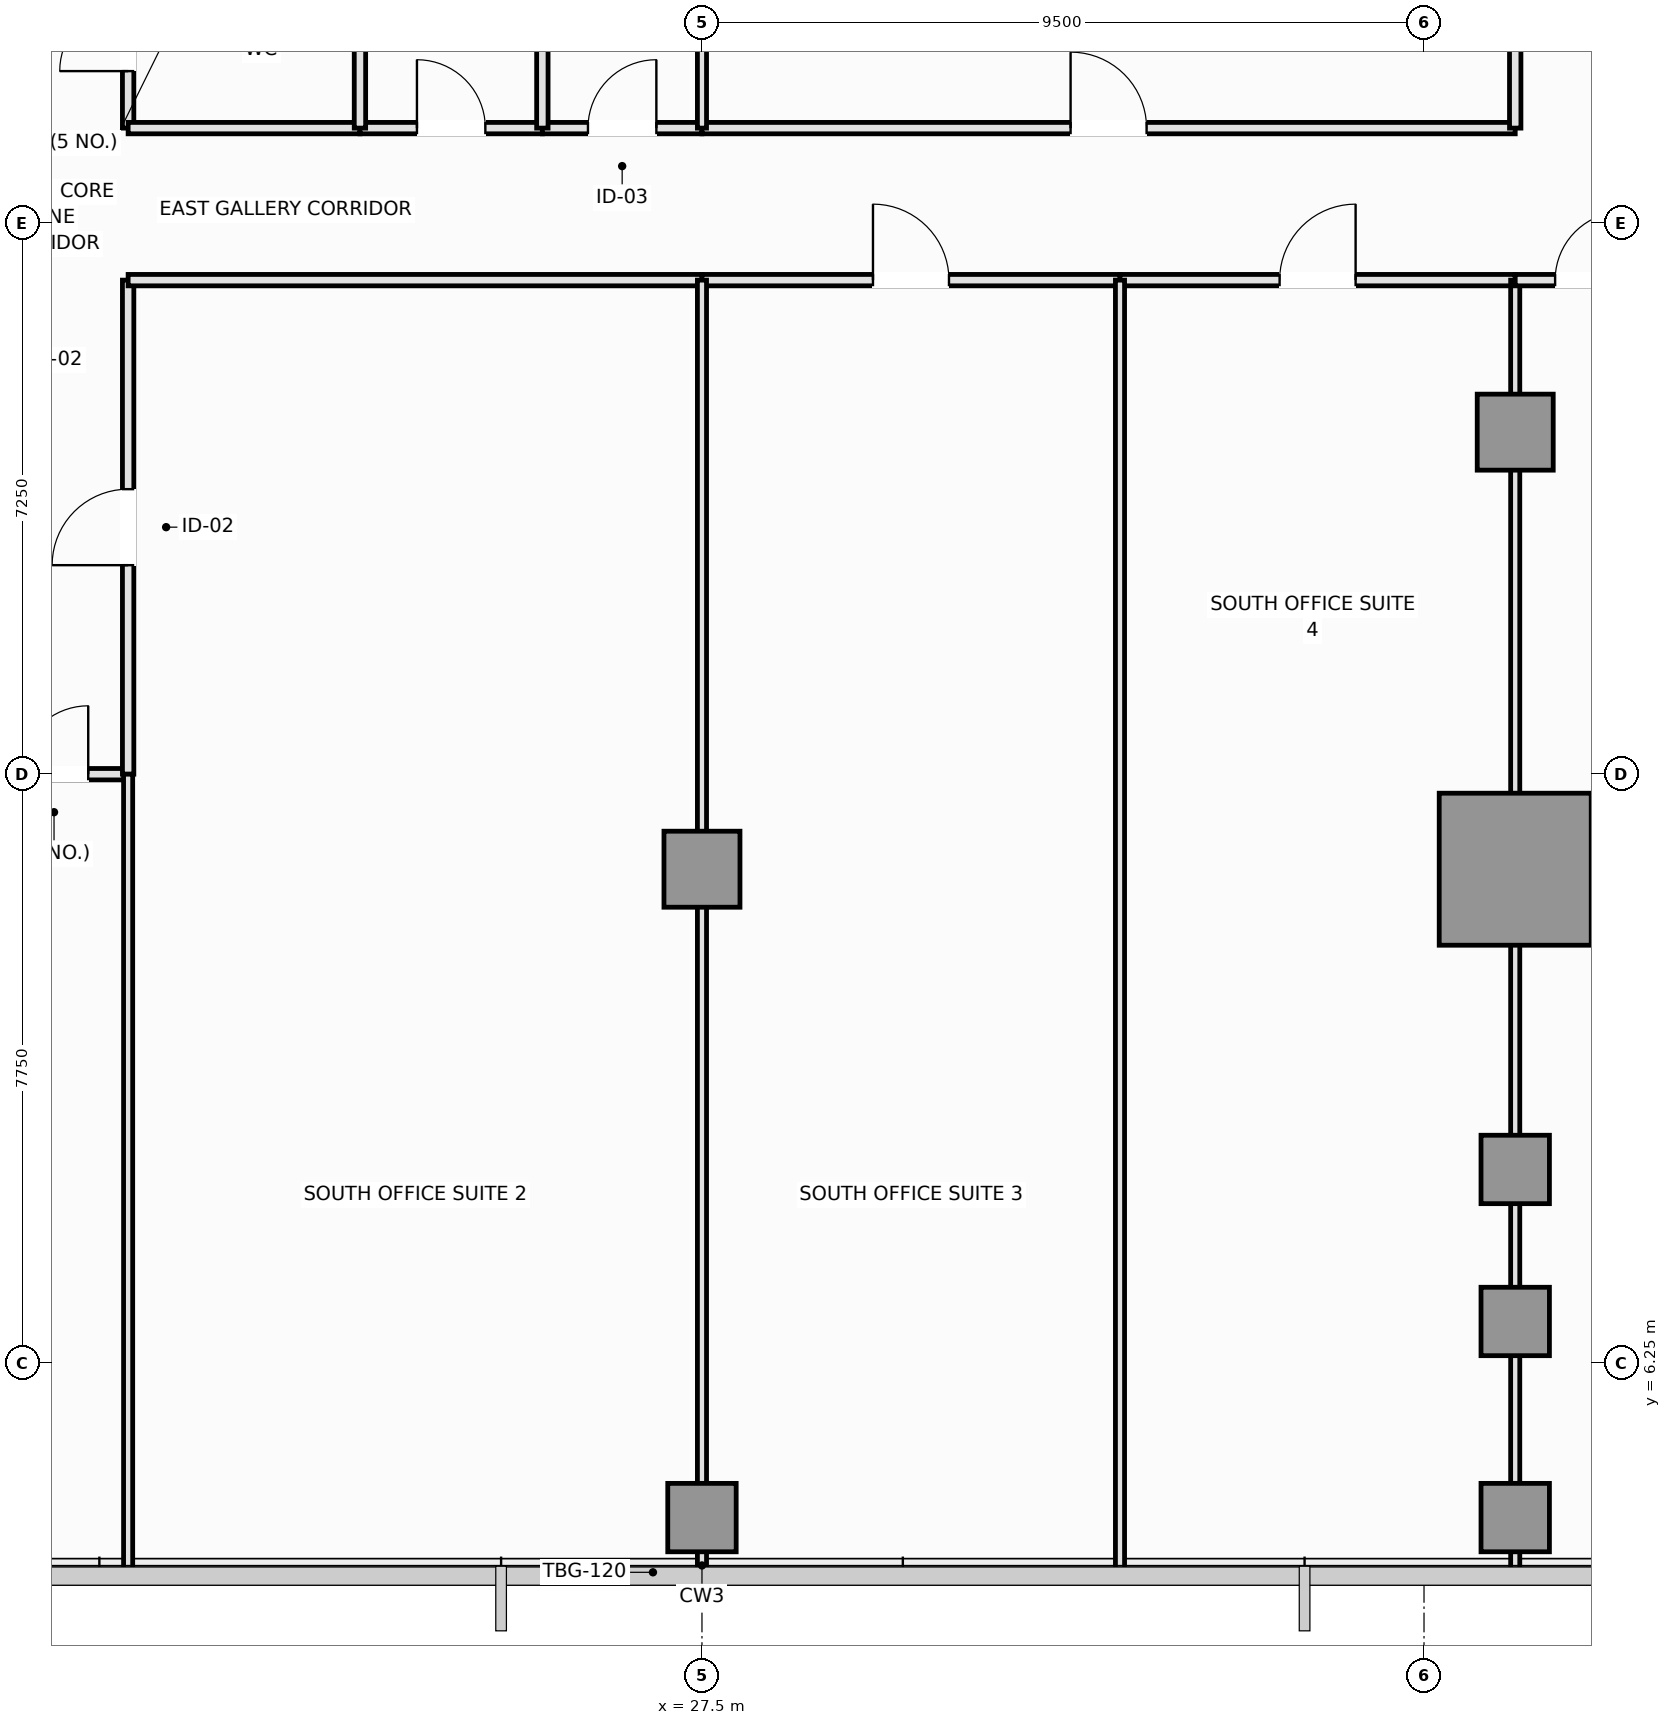
"""IFC4 building model, lengths in metres.
Left out: names, types, materials, properties, quantities, classifications, styles, units other than length and angle.
Written with IfcOpenShell. Run it as: python <this file> out.ifc"""

import sys

from ifc_helpers import new_model, si_unit, direction, frame, frame_2d, origin, origin_2d, place, context, subcontext, project, spatial, rectangle, extrude, element, fill, save


model = new_model("IFC4")
c1 = context("Model", 3, precision=1e-05, world=origin(), true_north=direction((0.0, 1.0)))
c2 = subcontext(c1, "Body", "Model", "MODEL_VIEW")
j1 = project(units=[si_unit("LENGTHUNIT", "METRE"), si_unit("PLANEANGLEUNIT", "RADIAN")], contexts=[c1])
p1 = place(None, origin())
s1 = spatial("IfcSite", under=j1, at=p1, CompositionType="ELEMENT")
p2 = place(p1, origin())
s2 = spatial("IfcBuilding", under=s1, at=p2, CompositionType="ELEMENT")
p3 = place(p2, frame((0.0, 0.0, 105.8)))
s3 = spatial("IfcBuildingStorey", under=s2, at=p3, CompositionType="ELEMENT", Elevation=105.8)
p4 = place(p3, frame((38.2, 12.75, 0.0), z_axis=(0.0, 0.0, 1.0), x_axis=(1.0, 0.0, 0.0)))
e1 = element("IfcColumn", 1, at=p4, inside=s3, PredefinedType="COLUMN", context=c2, shape_type="SweptSolid", body=[
    extrude(rectangle(XDim=2.0, YDim=2.0, at=origin_2d()), origin(), (0.0, 0.0, 1.0), 3.55),
])
for number, where, z_axis, x_axis in (
    (2, (27.5, 12.75, 0.0), (0.0, 0.0, 1.0), (1.0, 0.0, 0.0)),
    (3, (38.2, 18.5, 0.0), (0.0, 0.0, 1.0), (1.0, 0.0, 0.0)),
):
    element("IfcColumn", number, at=place(p3, frame(where, z_axis=z_axis, x_axis=x_axis)), inside=s3, PredefinedType="COLUMN", context=c2, shape_type="SweptSolid", body=[
        extrude(rectangle(XDim=1.0, YDim=1.0, at=origin_2d()), origin(), (0.0, 0.0, 1.0), 3.55),
    ])
for number, where, z_axis, x_axis in (
    (4, (38.2, 6.8, 0.0), (0.0, 0.0, 1.0), (1.0, 0.0, 0.0)),
    (5, (38.2, 8.8, 0.0), (0.0, 0.0, 1.0), (1.0, 0.0, 0.0)),
    (6, (27.5, 4.22, 0.0), (0.0, 0.0, 1.0), (1.0, 0.0, 0.0)),
    (7, (38.2, 4.22, 0.0), (0.0, 0.0, 1.0), (1.0, 0.0, 0.0)),
):
    element("IfcColumn", number, at=place(p3, frame(where, z_axis=z_axis, x_axis=x_axis)), inside=s3, PredefinedType="COLUMN", context=c2, shape_type="SweptSolid", body=[
        extrude(rectangle(XDim=0.9, YDim=0.9, at=origin_2d()), origin(), (0.0, 0.0, 1.0), 3.55),
    ])
p5 = place(p3, frame((19.95, 22.5, 0.0), z_axis=(0.0, 0.0, 1.0), x_axis=(0.0, 1.0, 0.0)))
e8 = element("IfcWall", 8, at=p5, inside=s3, PredefinedType="PLUMBINGWALL", context=c2, shape_type="SweptSolid", body=[
    extrude(rectangle(XDim=2.4, YDim=0.15, at=frame_2d((1.2, 0.0))), origin(), (0.0, 0.0, 1.0), 3.37),
])
p6 = place(p5, frame((0.75, 0.0, 0.0)))
e9 = element("IfcOpeningElement", 9, at=p6, cuts=e8, PredefinedType="OPENING", context=c2, shape_type="SweptSolid", body=[
    extrude(rectangle(XDim=0.9, YDim=2.1, at=frame_2d((0.45, 1.05))), frame((0.0, 0.085, 0.0), z_axis=(0.0, -1.0, 0.0), x_axis=(1.0, 0.0, 0.0)), (0.0, 0.0, 1.0), 0.17),
])
p7 = place(p3, frame((18.0, 14.0, 0.0), z_axis=(0.0, 0.0, 1.0), x_axis=(1.0, 0.0, 0.0)))
e10 = element("IfcWall", 10, at=p7, inside=s3, PredefinedType="PARTITIONING", context=c2, shape_type="SweptSolid", body=[
    extrude(rectangle(XDim=1.95, YDim=0.15, at=frame_2d((0.975, 0.0))), origin(), (0.0, 0.0, 1.0), 3.37),
])
p8 = place(p7, frame((0.525, 0.0, 0.0)))
e11 = element("IfcOpeningElement", 11, at=p8, cuts=e10, PredefinedType="OPENING", context=c2, shape_type="SweptSolid", body=[
    extrude(rectangle(XDim=0.9, YDim=2.1, at=frame_2d((0.45, 1.05))), frame((0.0, 0.085, 0.0), z_axis=(0.0, -1.0, 0.0), x_axis=(1.0, 0.0, 0.0)), (0.0, 0.0, 1.0), 0.17),
])
p9 = place(p3, frame((19.95, 14.0, 0.0), z_axis=(0.0, 0.0, 1.0), x_axis=(0.0, 1.0, 0.0)))
e12 = element("IfcWall", 12, at=p9, inside=s3, PredefinedType="PARTITIONING", context=c2, shape_type="SweptSolid", body=[
    extrude(rectangle(XDim=6.5, YDim=0.15, at=frame_2d((3.25, 0.0))), origin(), (0.0, 0.0, 1.0), 3.37),
])
p10 = place(p9, frame((2.75, 0.0, 0.0)))
e13 = element("IfcOpeningElement", 13, at=p10, cuts=e12, PredefinedType="OPENING", context=c2, shape_type="SweptSolid", body=[
    extrude(rectangle(XDim=1.0, YDim=2.15, at=frame_2d((0.5, 1.075))), frame((0.0, 0.085, 0.0), z_axis=(0.0, -1.0, 0.0), x_axis=(1.0, 0.0, 0.0)), (0.0, 0.0, 1.0), 0.17),
])
p11 = place(p3, frame((19.95, 22.5, 0.0), z_axis=(0.0, 0.0, 1.0), x_axis=(1.0, 0.0, 0.0)))
e14 = element("IfcWall", 14, at=p11, inside=s3, PredefinedType="PLUMBINGWALL", context=c2, shape_type="SweptSolid", body=[
    extrude(rectangle(XDim=3.05, YDim=0.15, at=frame_2d((1.525, 0.0))), origin(), (0.0, 0.0, 1.0), 3.37),
])
p12 = place(p3, frame((23.0, 22.5, 0.0), z_axis=(0.0, 0.0, 1.0), x_axis=(1.0, 0.0, 0.0)))
e15 = element("IfcWall", 15, at=p12, inside=s3, PredefinedType="PLUMBINGWALL", context=c2, shape_type="SweptSolid", body=[
    extrude(rectangle(XDim=2.4, YDim=0.15, at=frame_2d((1.2, 0.0))), origin(), (0.0, 0.0, 1.0), 3.37),
])
p13 = place(p12, frame((0.75, 0.0, 0.0)))
e16 = element("IfcOpeningElement", 16, at=p13, cuts=e15, PredefinedType="OPENING", context=c2, shape_type="SweptSolid", body=[
    extrude(rectangle(XDim=0.9, YDim=2.1, at=frame_2d((0.45, 1.05))), frame((0.0, 0.085, 0.0), z_axis=(0.0, -1.0, 0.0), x_axis=(1.0, 0.0, 0.0)), (0.0, 0.0, 1.0), 0.17),
])
p14 = place(p3, frame((25.4, 22.5, 0.0), z_axis=(0.0, 0.0, 1.0), x_axis=(1.0, 0.0, 0.0)))
e17 = element("IfcWall", 17, at=p14, inside=s3, PredefinedType="PARTITIONING", context=c2, shape_type="SweptSolid", body=[
    extrude(rectangle(XDim=2.1, YDim=0.15, at=frame_2d((1.05, 0.0))), origin(), (0.0, 0.0, 1.0), 3.37),
])
p15 = place(p14, frame((0.6, 0.0, 0.0)))
e18 = element("IfcOpeningElement", 18, at=p15, cuts=e17, PredefinedType="OPENING", context=c2, shape_type="SweptSolid", body=[
    extrude(rectangle(XDim=0.9, YDim=2.1, at=frame_2d((0.45, 1.05))), frame((0.0, 0.085, 0.0), z_axis=(0.0, -1.0, 0.0), x_axis=(1.0, 0.0, 0.0)), (0.0, 0.0, 1.0), 0.17),
])
p16 = place(p3, frame((19.95, 20.5, 0.0), z_axis=(0.0, 0.0, 1.0), x_axis=(1.0, 0.0, 0.0)))
e19 = element("IfcWall", 19, at=p16, inside=s3, PredefinedType="PARTITIONING", context=c2, shape_type="SweptSolid", body=[
    extrude(rectangle(XDim=7.55, YDim=0.15, at=frame_2d((3.775, 0.0))), origin(), (0.0, 0.0, 1.0), 3.37),
])
p17 = place(p3, frame((27.5, 20.5, 0.0), z_axis=(0.0, 0.0, 1.0), x_axis=(1.0, 0.0, 0.0)))
e20 = element("IfcWall", 20, at=p17, inside=s3, PredefinedType="PARTITIONING", context=c2, shape_type="SweptSolid", body=[
    extrude(rectangle(XDim=5.5, YDim=0.15, at=frame_2d((2.75, 0.0))), origin(), (0.0, 0.0, 1.0), 3.37),
])
p18 = place(p17, frame((2.25, 0.0, 0.0)))
e21 = element("IfcOpeningElement", 21, at=p18, cuts=e20, PredefinedType="OPENING", context=c2, shape_type="SweptSolid", body=[
    extrude(rectangle(XDim=1.0, YDim=2.15, at=frame_2d((0.5, 1.075))), frame((0.0, 0.085, 0.0), z_axis=(0.0, -1.0, 0.0), x_axis=(1.0, 0.0, 0.0)), (0.0, 0.0, 1.0), 0.17),
])
p19 = place(p3, frame((33.0, 20.5, 0.0), z_axis=(0.0, 0.0, 1.0), x_axis=(1.0, 0.0, 0.0)))
e22 = element("IfcWall", 22, at=p19, inside=s3, PredefinedType="PARTITIONING", context=c2, shape_type="SweptSolid", body=[
    extrude(rectangle(XDim=5.2, YDim=0.15, at=frame_2d((2.6, 0.0))), origin(), (0.0, 0.0, 1.0), 3.37),
])
p20 = place(p19, frame((2.1, 0.0, 0.0)))
e23 = element("IfcOpeningElement", 23, at=p20, cuts=e22, PredefinedType="OPENING", context=c2, shape_type="SweptSolid", body=[
    extrude(rectangle(XDim=1.0, YDim=2.15, at=frame_2d((0.5, 1.075))), frame((0.0, 0.085, 0.0), z_axis=(0.0, -1.0, 0.0), x_axis=(1.0, 0.0, 0.0)), (0.0, 0.0, 1.0), 0.17),
])
p21 = place(p3, frame((27.5, 22.5, 0.0), z_axis=(0.0, 0.0, 1.0), x_axis=(1.0, 0.0, 0.0)))
e24 = element("IfcWall", 24, at=p21, inside=s3, PredefinedType="PARTITIONING", context=c2, shape_type="SweptSolid", body=[
    extrude(rectangle(XDim=10.7, YDim=0.15, at=frame_2d((5.35, 0.0))), origin(), (0.0, 0.0, 1.0), 3.37),
])
p22 = place(p21, frame((4.85, 0.0, 0.0)))
e25 = element("IfcOpeningElement", 25, at=p22, cuts=e24, PredefinedType="OPENING", context=c2, shape_type="SweptSolid", body=[
    extrude(rectangle(XDim=1.0, YDim=2.15, at=frame_2d((0.5, 1.075))), frame((0.0, 0.085, 0.0), z_axis=(0.0, -1.0, 0.0), x_axis=(1.0, 0.0, 0.0)), (0.0, 0.0, 1.0), 0.17),
])
for number, where, z_axis, x_axis in (
    (26, (23.0, 22.5, 0.0), (0.0, 0.0, 1.0), (0.0, 1.0, 0.0)),
    (27, (25.4, 22.5, 0.0), (0.0, 0.0, 1.0), (0.0, 1.0, 0.0)),
):
    element("IfcWall", number, at=place(p3, frame(where, z_axis=z_axis, x_axis=x_axis)), inside=s3, PredefinedType="PLUMBINGWALL", context=c2, shape_type="SweptSolid", body=[
        extrude(rectangle(XDim=2.4, YDim=0.15, at=frame_2d((1.2, 0.0))), origin(), (0.0, 0.0, 1.0), 3.37),
    ])
p23 = place(p3, frame((27.5, 22.5, 0.0), z_axis=(0.0, 0.0, 1.0), x_axis=(0.0, 1.0, 0.0)))
e28 = element("IfcWall", 28, at=p23, inside=s3, PredefinedType="PARTITIONING", context=c2, shape_type="SweptSolid", body=[
    extrude(rectangle(XDim=8.4, YDim=0.12, at=frame_2d((4.2, 0.0))), origin(), (0.0, 0.0, 1.0), 3.37),
])
p24 = place(p3, frame((19.95, 3.51, 0.0), z_axis=(0.0, 0.0, 1.0), x_axis=(0.0, 1.0, 0.0)))
e29 = element("IfcWall", 29, at=p24, inside=s3, PredefinedType="PARTITIONING", context=c2, shape_type="SweptSolid", body=[
    extrude(rectangle(XDim=10.49, YDim=0.12, at=frame_2d((5.245, 0.0))), origin(), (0.0, 0.0, 1.0), 3.37),
])
p25 = place(p3, frame((27.5, 3.51, 0.0), z_axis=(0.0, 0.0, 1.0), x_axis=(0.0, 1.0, 0.0)))
e30 = element("IfcWall", 30, at=p25, inside=s3, PredefinedType="PARTITIONING", context=c2, shape_type="SweptSolid", body=[
    extrude(rectangle(XDim=16.99, YDim=0.12, at=frame_2d((8.495, 0.0))), origin(), (0.0, 0.0, 1.0), 2.87),
])
p26 = place(p3, frame((33.0, 3.51, 0.0), z_axis=(0.0, 0.0, 1.0), x_axis=(0.0, 1.0, 0.0)))
e31 = element("IfcWall", 31, at=p26, inside=s3, PredefinedType="PARTITIONING", context=c2, shape_type="SweptSolid", body=[
    extrude(rectangle(XDim=16.99, YDim=0.12, at=frame_2d((8.495, 0.0))), origin(), (0.0, 0.0, 1.0), 3.37),
])
p27 = place(p3, frame((38.2, 3.51, 0.0), z_axis=(0.0, 0.0, 1.0), x_axis=(0.0, 1.0, 0.0)))
e32 = element("IfcWall", 32, at=p27, inside=s3, PredefinedType="PARTITIONING", context=c2, shape_type="SweptSolid", body=[
    extrude(rectangle(XDim=16.99, YDim=0.12, at=frame_2d((8.495, 0.0))), origin(), (0.0, 0.0, 1.0), 2.87),
])
p28 = place(p3, frame((38.2, 22.5, 0.0), z_axis=(0.0, 0.0, 1.0), x_axis=(0.0, 1.0, 0.0)))
e33 = element("IfcWall", 33, at=p28, inside=s3, PredefinedType="PARTITIONING", context=c2, shape_type="SweptSolid", body=[
    extrude(rectangle(XDim=7.3, YDim=0.15, at=frame_2d((3.65, 0.0))), origin(), (0.0, 0.0, 1.0), 2.87),
])
p29 = place(p3, frame((38.2, 20.5, 0.0), z_axis=(0.0, 0.0, 1.0), x_axis=(1.0, 0.0, 0.0)))
e34 = element("IfcWall", 34, at=p29, inside=s3, PredefinedType="PARTITIONING", context=c2, shape_type="SweptSolid", body=[
    extrude(rectangle(XDim=1.95, YDim=0.15, at=frame_2d((0.975, 0.0))), origin(), (0.0, 0.0, 1.0), 3.37),
])
p30 = place(p29, frame((0.525, 0.0, 0.0)))
e35 = element("IfcOpeningElement", 35, at=p30, cuts=e34, PredefinedType="OPENING", context=c2, shape_type="SweptSolid", body=[
    extrude(rectangle(XDim=0.9, YDim=2.1, at=frame_2d((0.45, 1.05))), frame((0.0, 0.085, 0.0), z_axis=(0.0, -1.0, 0.0), x_axis=(1.0, 0.0, 0.0)), (0.0, 0.0, 1.0), 0.17),
])
p31 = place(p6, origin())
e36 = element("IfcDoor", 36, at=p31, inside=s3, OperationType="SINGLE_SWING_LEFT", PredefinedType="DOOR", context=c2, shape_type="SweptSolid", body=[
    extrude(rectangle(XDim=0.9, YDim=2.1, at=frame_2d((0.45, 1.05))), frame((0.0, 0.025, 0.0), z_axis=(0.0, -1.0, 0.0), x_axis=(1.0, 0.0, 0.0)), (0.0, 0.0, 1.0), 0.05),
])
fill(e9, e36)
p32 = place(p8, origin())
e37 = element("IfcDoor", 37, at=p32, inside=s3, OperationType="SINGLE_SWING_RIGHT", PredefinedType="DOOR", context=c2, shape_type="SweptSolid", body=[
    extrude(rectangle(XDim=0.9, YDim=2.1, at=frame_2d((0.45, 1.05))), frame((0.0, 0.025, 0.0), z_axis=(0.0, -1.0, 0.0), x_axis=(1.0, 0.0, 0.0)), (0.0, 0.0, 1.0), 0.05),
])
fill(e11, e37)
p33 = place(p10, origin())
e38 = element("IfcDoor", 38, at=p33, inside=s3, OperationType="SINGLE_SWING_LEFT", PredefinedType="DOOR", context=c2, shape_type="SweptSolid", body=[
    extrude(rectangle(XDim=1.0, YDim=2.15, at=frame_2d((0.5, 1.075))), frame((0.0, 0.025, 0.0), z_axis=(0.0, -1.0, 0.0), x_axis=(1.0, 0.0, 0.0)), (0.0, 0.0, 1.0), 0.05),
])
fill(e13, e38)
p34 = place(p13, origin())
e39 = element("IfcDoor", 39, at=p34, inside=s3, OperationType="SINGLE_SWING_LEFT", PredefinedType="DOOR", context=c2, shape_type="SweptSolid", body=[
    extrude(rectangle(XDim=0.9, YDim=2.1, at=frame_2d((0.45, 1.05))), frame((0.0, 0.025, 0.0), z_axis=(0.0, -1.0, 0.0), x_axis=(1.0, 0.0, 0.0)), (0.0, 0.0, 1.0), 0.05),
])
fill(e16, e39)
p35 = place(p15, origin())
e40 = element("IfcDoor", 40, at=p35, inside=s3, OperationType="SINGLE_SWING_RIGHT", PredefinedType="DOOR", context=c2, shape_type="SweptSolid", body=[
    extrude(rectangle(XDim=0.9, YDim=2.1, at=frame_2d((0.45, 1.05))), frame((0.0, 0.025, 0.0), z_axis=(0.0, -1.0, 0.0), x_axis=(1.0, 0.0, 0.0)), (0.0, 0.0, 1.0), 0.05),
])
fill(e18, e40)
p36 = place(p18, origin())
e41 = element("IfcDoor", 41, at=p36, inside=s3, OperationType="SINGLE_SWING_LEFT", PredefinedType="DOOR", context=c2, shape_type="SweptSolid", body=[
    extrude(rectangle(XDim=1.0, YDim=2.15, at=frame_2d((0.5, 1.075))), frame((0.0, 0.025, 0.0), z_axis=(0.0, -1.0, 0.0), x_axis=(1.0, 0.0, 0.0)), (0.0, 0.0, 1.0), 0.05),
])
fill(e21, e41)
p37 = place(p20, origin())
e42 = element("IfcDoor", 42, at=p37, inside=s3, OperationType="SINGLE_SWING_RIGHT", PredefinedType="DOOR", context=c2, shape_type="SweptSolid", body=[
    extrude(rectangle(XDim=1.0, YDim=2.15, at=frame_2d((0.5, 1.075))), frame((0.0, 0.025, 0.0), z_axis=(0.0, -1.0, 0.0), x_axis=(1.0, 0.0, 0.0)), (0.0, 0.0, 1.0), 0.05),
])
fill(e23, e42)
p38 = place(p22, origin())
e43 = element("IfcDoor", 43, at=p38, inside=s3, OperationType="SINGLE_SWING_LEFT", PredefinedType="DOOR", context=c2, shape_type="SweptSolid", body=[
    extrude(rectangle(XDim=1.0, YDim=2.15, at=frame_2d((0.5, 1.075))), frame((0.0, 0.025, 0.0), z_axis=(0.0, -1.0, 0.0), x_axis=(1.0, 0.0, 0.0)), (0.0, 0.0, 1.0), 0.05),
])
fill(e25, e43)
p39 = place(p30, origin())
e44 = element("IfcDoor", 44, at=p39, inside=s3, OperationType="SINGLE_SWING_RIGHT", PredefinedType="DOOR", context=c2, shape_type="SweptSolid", body=[
    extrude(rectangle(XDim=0.9, YDim=2.1, at=frame_2d((0.45, 1.05))), frame((0.0, 0.025, 0.0), z_axis=(0.0, -1.0, 0.0), x_axis=(1.0, 0.0, 0.0)), (0.0, 0.0, 1.0), 0.05),
])
fill(e35, e44)
save(model, sys.argv[1])
